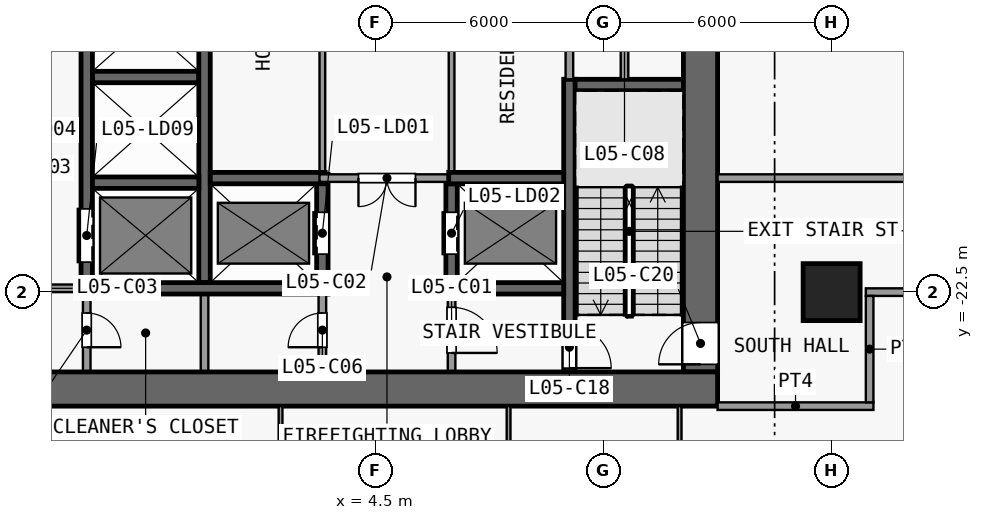
"""IFC4 building model, lengths in metres.
Left out: names, types, materials, properties, quantities, classifications, styles, units other than length and angle.
Written with IfcOpenShell. Run it as: python <this file> out.ifc"""

import sys

from ifc_helpers import new_model, si_unit, direction, frame, frame_2d, origin, origin_2d, place, context, subcontext, project, spatial, rectangle, extrude, element, fill, save


model = new_model("IFC4")
c1 = context("Model", 3, precision=1e-05, world=origin(), true_north=direction((0.0, 1.0)))
c2 = subcontext(c1, "Body", "Model", "MODEL_VIEW")
j1 = project(units=[si_unit("LENGTHUNIT", "METRE"), si_unit("PLANEANGLEUNIT", "RADIAN")], contexts=[c1])
p1 = place(None, origin())
s1 = spatial("IfcSite", under=j1, at=p1, CompositionType="ELEMENT")
p2 = place(p1, origin())
s2 = spatial("IfcBuilding", under=s1, at=p2, CompositionType="ELEMENT")
p3 = place(p2, frame((0.0, 0.0, 28.0)))
s3 = spatial("IfcBuildingStorey", under=s2, at=p3, CompositionType="ELEMENT", Elevation=28.0)
p4 = place(p3, frame((16.5, -22.5, 0.0), z_axis=(0.0, 0.0, 1.0), x_axis=(1.0, 0.0, 0.0)))
e1 = element("IfcColumn", 1, at=p4, inside=s3, PredefinedType="COLUMN", context=c2, shape_type="SweptSolid", body=[
    extrude(rectangle(XDim=1.5, YDim=1.5, at=origin_2d()), origin(), (0.0, 0.0, 1.0), 4.5),
])
p5 = place(p3, frame((-13.5, -25.05, 0.0), z_axis=(0.0, 0.0, 1.0), x_axis=(1.0, 0.0, 0.0)))
e2 = element("IfcWall", 2, at=p5, inside=s3, PredefinedType="SHEAR", context=c2, shape_type="SweptSolid", body=[
    extrude(rectangle(XDim=27.0, YDim=0.9, at=frame_2d((13.5, 0.0))), origin(), (0.0, 0.0, 1.0), 4.1),
])
p6 = place(p3, frame((13.05, -24.6, 0.0), z_axis=(0.0, 0.0, 1.0), x_axis=(0.0, 1.0, 0.0)))
e3 = element("IfcWall", 3, at=p6, inside=s3, PredefinedType="SHEAR", context=c2, shape_type="SweptSolid", body=[
    extrude(rectangle(XDim=16.1, YDim=0.9, at=frame_2d((8.05, 0.0))), origin(), (0.0, 0.0, 1.0), 4.1),
])
p7 = place(p6, frame((0.2, 0.0, 0.0)))
e4 = element("IfcOpeningElement", 4, at=p7, cuts=e3, PredefinedType="OPENING", context=c2, shape_type="SweptSolid", body=[
    extrude(rectangle(XDim=1.1, YDim=2.1, at=frame_2d((0.55, 1.05))), frame((0.0, 0.46, 0.0), z_axis=(0.0, -1.0, 0.0), x_axis=(1.0, 0.0, 0.0)), (0.0, 0.0, 1.0), 0.92),
])
p8 = place(p3, frame((-3.25, -22.4, 0.0), z_axis=(0.0, 0.0, 1.0), x_axis=(-1.0, 0.0, 0.0)))
e5 = element("IfcWall", 5, at=p8, inside=s3, PredefinedType="PARTITIONING", context=c2, shape_type="SweptSolid", body=[
    extrude(rectangle(XDim=3.1, YDim=0.2, at=frame_2d((1.55, 0.0))), origin(), (0.0, 0.0, 1.0), 4.1),
])
p9 = place(p8, frame((0.8, 0.0, 0.0)))
e6 = element("IfcOpeningElement", 6, at=p9, cuts=e5, PredefinedType="OPENING", context=c2, shape_type="SweptSolid", body=[
    extrude(rectangle(XDim=1.5, YDim=2.1, at=frame_2d((0.75, 1.05))), frame((0.0, 0.11, 0.0), z_axis=(0.0, -1.0, 0.0), x_axis=(1.0, 0.0, 0.0)), (0.0, 0.0, 1.0), 0.22),
])
p10 = place(p3, frame((-2.95, -22.4, 0.0), z_axis=(0.0, 0.0, 1.0), x_axis=(1.0, 0.0, 0.0)))
e7 = element("IfcWall", 7, at=p10, inside=s3, PredefinedType="SHEAR", context=c2, shape_type="SweptSolid", body=[
    extrude(rectangle(XDim=6.2, YDim=0.3, at=frame_2d((3.1, 0.0))), origin(), (0.0, 0.0, 1.0), 4.1),
])
p11 = place(p3, frame((6.35, -22.4, 0.0), z_axis=(0.0, 0.0, 1.0), x_axis=(1.0, 0.0, 0.0)))
e8 = element("IfcWall", 8, at=p11, inside=s3, PredefinedType="SHEAR", context=c2, shape_type="SweptSolid", body=[
    extrude(rectangle(XDim=3.1, YDim=0.3, at=frame_2d((1.55, 0.0))), origin(), (0.0, 0.0, 1.0), 4.1),
])
p12 = place(p3, frame((-2.95, -19.62, 0.0), z_axis=(0.0, 0.0, 1.0), x_axis=(1.0, 0.0, 0.0)))
e9 = element("IfcWall", 9, at=p12, inside=s3, PredefinedType="SHEAR", context=c2, shape_type="SweptSolid", body=[
    extrude(rectangle(XDim=2.8, YDim=0.3, at=frame_2d((1.4, 0.0))), origin(), (0.0, 0.0, 1.0), 4.1),
])
p13 = place(p3, frame((0.15, -19.5, 0.0), z_axis=(0.0, 0.0, 1.0), x_axis=(1.0, 0.0, 0.0)))
e10 = element("IfcWall", 10, at=p13, inside=s3, PredefinedType="SHEAR", context=c2, shape_type="SweptSolid", body=[
    extrude(rectangle(XDim=3.025, YDim=0.3, at=frame_2d((1.513, 0.0))), origin(), (0.0, 0.0, 1.0), 4.1),
])
p14 = place(p3, frame((6.575, -19.5, 0.0), z_axis=(0.0, 0.0, 1.0), x_axis=(-1.0, 0.0, 0.0)))
e11 = element("IfcWall", 11, at=p14, inside=s3, PredefinedType="PARTITIONING", context=c2, shape_type="SweptSolid", body=[
    extrude(rectangle(XDim=3.55, YDim=0.2, at=frame_2d((1.775, 0.0))), origin(), (0.0, 0.0, 1.0), 4.1),
])
p15 = place(p14, frame((1.025, 0.0, 0.0)))
e12 = element("IfcOpeningElement", 12, at=p15, cuts=e11, PredefinedType="OPENING", context=c2, shape_type="SweptSolid", body=[
    extrude(rectangle(XDim=1.5, YDim=2.1, at=frame_2d((0.75, 1.05))), frame((0.0, 0.11, 0.0), z_axis=(0.0, -1.0, 0.0), x_axis=(1.0, 0.0, 0.0)), (0.0, 0.0, 1.0), 0.22),
])
p16 = place(p3, frame((6.425, -19.5, 0.0), z_axis=(0.0, 0.0, 1.0), x_axis=(1.0, 0.0, 0.0)))
e13 = element("IfcWall", 13, at=p16, inside=s3, PredefinedType="SHEAR", context=c2, shape_type="SweptSolid", body=[
    extrude(rectangle(XDim=3.025, YDim=0.3, at=frame_2d((1.512, 0.0))), origin(), (0.0, 0.0, 1.0), 4.1),
])
p17 = place(p3, frame((9.5, -17.05, 0.0), z_axis=(0.0, 0.0, 1.0), x_axis=(1.0, 0.0, 0.0)))
e14 = element("IfcWall", 14, at=p17, inside=s3, PredefinedType="SHEAR", context=c2, shape_type="SweptSolid", body=[
    extrude(rectangle(XDim=3.1, YDim=0.3, at=frame_2d((1.55, 0.0))), origin(), (0.0, 0.0, 1.0), 4.1),
])
p18 = place(p3, frame((-2.95, -16.84, 0.0), z_axis=(0.0, 0.0, 1.0), x_axis=(1.0, 0.0, 0.0)))
e15 = element("IfcWall", 15, at=p18, inside=s3, PredefinedType="SHEAR", context=c2, shape_type="SweptSolid", body=[
    extrude(rectangle(XDim=2.8, YDim=0.3, at=frame_2d((1.4, 0.0))), origin(), (0.0, 0.0, 1.0), 4.1),
])
p19 = place(p3, frame((-3.1, -22.55, 0.0), z_axis=(0.0, 0.0, 1.0), x_axis=(0.0, -1.0, 0.0)))
e16 = element("IfcWall", 16, at=p19, inside=s3, PredefinedType="PARTITIONING", context=c2, shape_type="SweptSolid", body=[
    extrude(rectangle(XDim=2.05, YDim=0.2, at=frame_2d((1.025, 0.0))), origin(), (0.0, 0.0, 1.0), 4.1),
])
p20 = place(p19, frame((0.5, 0.0, 0.0)))
e17 = element("IfcOpeningElement", 17, at=p20, cuts=e16, PredefinedType="OPENING", context=c2, shape_type="SweptSolid", body=[
    extrude(rectangle(XDim=0.9, YDim=2.1, at=frame_2d((0.45, 1.05))), frame((0.0, 0.11, 0.0), z_axis=(0.0, -1.0, 0.0), x_axis=(1.0, 0.0, 0.0)), (0.0, 0.0, 1.0), 0.22),
])
p21 = place(p3, frame((-3.1, -22.55, 0.0), z_axis=(0.0, 0.0, 1.0), x_axis=(0.0, 1.0, 0.0)))
e18 = element("IfcWall", 18, at=p21, inside=s3, PredefinedType="SHEAR", context=c2, shape_type="SweptSolid", body=[
    extrude(rectangle(XDim=14.05, YDim=0.3, at=frame_2d((7.025, 0.0))), origin(), (0.0, 0.0, 1.0), 4.1),
])
p22 = place(p21, frame((12.11, 0.0, 0.0)))
e19 = element("IfcOpeningElement", 19, at=p22, cuts=e18, PredefinedType="OPENING", context=c2, shape_type="SweptSolid", body=[
    extrude(rectangle(XDim=1.1, YDim=2.1, at=frame_2d((0.55, 1.05))), frame((0.0, 0.16, 0.0), z_axis=(0.0, -1.0, 0.0), x_axis=(1.0, 0.0, 0.0)), (0.0, 0.0, 1.0), 0.32),
])
p23 = place(p21, frame((0.84, 0.0, 0.0)))
e20 = element("IfcOpeningElement", 20, at=p23, cuts=e18, PredefinedType="OPENING", context=c2, shape_type="SweptSolid", body=[
    extrude(rectangle(XDim=1.4, YDim=2.1, at=frame_2d((0.7, 1.05))), frame((0.0, 0.16, 0.0), z_axis=(0.0, -1.0, 0.0), x_axis=(1.0, 0.0, 0.0)), (0.0, 0.0, 1.0), 0.32),
])
p24 = place(p3, frame((0.0, -24.6, 0.0), z_axis=(0.0, 0.0, 1.0), x_axis=(0.0, 1.0, 0.0)))
e21 = element("IfcWall", 21, at=p24, inside=s3, PredefinedType="PARTITIONING", context=c2, shape_type="SweptSolid", body=[
    extrude(rectangle(XDim=2.05, YDim=0.2, at=frame_2d((1.025, 0.0))), origin(), (0.0, 0.0, 1.0), 4.1),
])
p25 = place(p3, frame((0.0, -22.25, 0.0), z_axis=(0.0, 0.0, 1.0), x_axis=(0.0, 1.0, 0.0)))
e22 = element("IfcWall", 22, at=p25, inside=s3, PredefinedType="SHEAR", context=c2, shape_type="SweptSolid", body=[
    extrude(rectangle(XDim=13.75, YDim=0.3, at=frame_2d((6.875, 0.0))), origin(), (0.0, 0.0, 1.0), 4.1),
])
p26 = place(p3, frame((3.1, -24.6, 0.0), z_axis=(0.0, 0.0, 1.0), x_axis=(0.0, 1.0, 0.0)))
e23 = element("IfcWall", 23, at=p26, inside=s3, PredefinedType="PARTITIONING", context=c2, shape_type="SweptSolid", body=[
    extrude(rectangle(XDim=2.05, YDim=0.2, at=frame_2d((1.025, 0.0))), origin(), (0.0, 0.0, 1.0), 4.1),
])
p27 = place(p26, frame((0.65, 0.0, 0.0)))
e24 = element("IfcOpeningElement", 24, at=p27, cuts=e23, PredefinedType="OPENING", context=c2, shape_type="SweptSolid", body=[
    extrude(rectangle(XDim=0.9, YDim=2.1, at=frame_2d((0.45, 1.05))), frame((0.0, 0.11, 0.0), z_axis=(0.0, -1.0, 0.0), x_axis=(1.0, 0.0, 0.0)), (0.0, 0.0, 1.0), 0.22),
])
p28 = place(p3, frame((3.1, -22.25, 0.0), z_axis=(0.0, 0.0, 1.0), x_axis=(0.0, 1.0, 0.0)))
e25 = element("IfcWall", 25, at=p28, inside=s3, PredefinedType="SHEAR", context=c2, shape_type="SweptSolid", body=[
    extrude(rectangle(XDim=2.85, YDim=0.3, at=frame_2d((1.425, 0.0))), origin(), (0.0, 0.0, 1.0), 4.1),
])
p29 = place(p28, frame((0.75, 0.0, 0.0)))
e26 = element("IfcOpeningElement", 26, at=p29, cuts=e25, PredefinedType="OPENING", context=c2, shape_type="SweptSolid", body=[
    extrude(rectangle(XDim=1.1, YDim=2.1, at=frame_2d((0.55, 1.05))), frame((0.0, 0.16, 0.0), z_axis=(0.0, -1.0, 0.0), x_axis=(1.0, 0.0, 0.0)), (0.0, 0.0, 1.0), 0.32),
])
p30 = place(p3, frame((3.1, -19.4, 0.0), z_axis=(0.0, 0.0, 1.0), x_axis=(0.0, 1.0, 0.0)))
e27 = element("IfcWall", 27, at=p30, inside=s3, PredefinedType="PARTITIONING", context=c2, shape_type="SweptSolid", body=[
    extrude(rectangle(XDim=10.9, YDim=0.15, at=frame_2d((5.45, 0.0))), origin(), (0.0, 0.0, 1.0), 4.1),
])
p31 = place(p30, frame((4.8, 0.0, 0.0)))
e28 = element("IfcOpeningElement", 28, at=p31, cuts=e27, PredefinedType="OPENING", context=c2, shape_type="SweptSolid", body=[
    extrude(rectangle(XDim=1.2, YDim=2.1, at=frame_2d((0.6, 1.05))), frame((0.0, 0.085, 0.0), z_axis=(0.0, -1.0, 0.0), x_axis=(1.0, 0.0, 0.0)), (0.0, 0.0, 1.0), 0.17),
])
p32 = place(p3, frame((6.5, -22.55, 0.0), z_axis=(0.0, 0.0, 1.0), x_axis=(0.0, -1.0, 0.0)))
e29 = element("IfcWall", 29, at=p32, inside=s3, PredefinedType="PARTITIONING", context=c2, shape_type="SweptSolid", body=[
    extrude(rectangle(XDim=2.05, YDim=0.2, at=frame_2d((1.025, 0.0))), origin(), (0.0, 0.0, 1.0), 4.1),
])
p33 = place(p32, frame((0.35, 0.0, 0.0)))
e30 = element("IfcOpeningElement", 30, at=p33, cuts=e29, PredefinedType="OPENING", context=c2, shape_type="SweptSolid", body=[
    extrude(rectangle(XDim=1.2, YDim=2.1, at=frame_2d((0.6, 1.05))), frame((0.0, 0.11, 0.0), z_axis=(0.0, -1.0, 0.0), x_axis=(1.0, 0.0, 0.0)), (0.0, 0.0, 1.0), 0.22),
])
p34 = place(p3, frame((6.5, -22.25, 0.0), z_axis=(0.0, 0.0, 1.0), x_axis=(0.0, 1.0, 0.0)))
e31 = element("IfcWall", 31, at=p34, inside=s3, PredefinedType="SHEAR", context=c2, shape_type="SweptSolid", body=[
    extrude(rectangle(XDim=2.6, YDim=0.3, at=frame_2d((1.3, 0.0))), origin(), (0.0, 0.0, 1.0), 4.1),
])
p35 = place(p34, frame((0.75, 0.0, 0.0)))
e32 = element("IfcOpeningElement", 32, at=p35, cuts=e31, PredefinedType="OPENING", context=c2, shape_type="SweptSolid", body=[
    extrude(rectangle(XDim=1.1, YDim=2.1, at=frame_2d((0.55, 1.05))), frame((0.0, 0.16, 0.0), z_axis=(0.0, -1.0, 0.0), x_axis=(1.0, 0.0, 0.0)), (0.0, 0.0, 1.0), 0.32),
])
p36 = place(p3, frame((6.5, -8.5, 0.0), z_axis=(0.0, 0.0, 1.0), x_axis=(0.0, -1.0, 0.0)))
e33 = element("IfcWall", 33, at=p36, inside=s3, PredefinedType="PARTITIONING", context=c2, shape_type="SweptSolid", body=[
    extrude(rectangle(XDim=10.85, YDim=0.15, at=frame_2d((5.425, 0.0))), origin(), (0.0, 0.0, 1.0), 4.1),
])
p37 = place(p36, frame((6.275, 0.0, 0.0)))
e34 = element("IfcOpeningElement", 34, at=p37, cuts=e33, PredefinedType="OPENING", context=c2, shape_type="SweptSolid", body=[
    extrude(rectangle(XDim=1.2, YDim=2.1, at=frame_2d((0.6, 1.05))), frame((0.0, 0.085, 0.0), z_axis=(0.0, -1.0, 0.0), x_axis=(1.0, 0.0, 0.0)), (0.0, 0.0, 1.0), 0.17),
])
p38 = place(p36, frame((0.925, 0.0, 0.0)))
e35 = element("IfcOpeningElement", 35, at=p38, cuts=e33, PredefinedType="OPENING", context=c2, shape_type="SweptSolid", body=[
    extrude(rectangle(XDim=0.9, YDim=2.1, at=frame_2d((0.45, 1.05))), frame((0.0, 0.085, 0.0), z_axis=(0.0, -1.0, 0.0), x_axis=(1.0, 0.0, 0.0)), (0.0, 0.0, 1.0), 0.17),
])
p39 = place(p3, frame((9.6, -16.9, 0.0), z_axis=(0.0, 0.0, 1.0), x_axis=(0.0, -1.0, 0.0)))
e36 = element("IfcWall", 36, at=p39, inside=s3, PredefinedType="SHEAR", context=c2, shape_type="SweptSolid", body=[
    extrude(rectangle(XDim=7.7, YDim=0.3, at=frame_2d((3.85, 0.0))), origin(), (0.0, 0.0, 1.0), 4.1),
])
p40 = place(p39, frame((6.5, 0.0, 0.0)))
e37 = element("IfcOpeningElement", 37, at=p40, cuts=e36, PredefinedType="OPENING", context=c2, shape_type="SweptSolid", body=[
    extrude(rectangle(XDim=1.1, YDim=2.1, at=frame_2d((0.55, 1.05))), frame((0.0, 0.16, 0.0), z_axis=(0.0, -1.0, 0.0), x_axis=(1.0, 0.0, 0.0)), (0.0, 0.0, 1.0), 0.32),
])
p41 = place(p3, frame((9.6, -16.9, 0.0), z_axis=(0.0, 0.0, 1.0), x_axis=(0.0, 1.0, 0.0)))
e38 = element("IfcWall", 38, at=p41, inside=s3, PredefinedType="PARTITIONING", context=c2, shape_type="SweptSolid", body=[
    extrude(rectangle(XDim=8.4, YDim=0.2, at=frame_2d((4.2, 0.0))), origin(), (0.0, 0.0, 1.0), 4.1),
])
p42 = place(p3, frame((11.05, -11.2, 0.0), z_axis=(0.0, 0.0, 1.0), x_axis=(0.0, -1.0, 0.0)))
e39 = element("IfcWall", 39, at=p42, inside=s3, PredefinedType="PARTITIONING", context=c2, shape_type="SweptSolid", body=[
    extrude(rectangle(XDim=5.7, YDim=0.2, at=frame_2d((2.85, 0.0))), origin(), (0.0, 0.0, 1.0), 4.1),
])
p43 = place(p42, frame((2.525, 0.0, 0.0)))
e40 = element("IfcOpeningElement", 40, at=p43, cuts=e39, PredefinedType="OPENING", context=c2, shape_type="SweptSolid", body=[
    extrude(rectangle(XDim=0.9, YDim=2.1, at=frame_2d((0.45, 1.05))), frame((0.0, 0.11, 0.0), z_axis=(0.0, -1.0, 0.0), x_axis=(1.0, 0.0, 0.0)), (0.0, 0.0, 1.0), 0.22),
])
p44 = place(p3, frame((13.5, -25.5, 0.0), z_axis=(0.0, 0.0, 1.0), x_axis=(1.0, 0.0, 0.0)))
e41 = element("IfcWall", 41, at=p44, inside=s3, PredefinedType="PARTITIONING", context=c2, shape_type="SweptSolid", body=[
    extrude(rectangle(XDim=4.1, YDim=0.2, at=frame_2d((2.05, 0.0))), origin(), (0.0, 0.0, 1.0), 4.1),
])
p45 = place(p3, frame((17.4, -22.5, 0.0), z_axis=(0.0, 0.0, 1.0), x_axis=(1.0, 0.0, 0.0)))
e42 = element("IfcWall", 42, at=p45, inside=s3, PredefinedType="PARTITIONING", context=c2, shape_type="SweptSolid", body=[
    extrude(rectangle(XDim=14.1, YDim=0.2, at=frame_2d((7.05, 0.0))), origin(), (0.0, 0.0, 1.0), 4.1),
])
p46 = place(p3, frame((13.5, -19.5, 0.0), z_axis=(0.0, 0.0, 1.0), x_axis=(1.0, 0.0, 0.0)))
e43 = element("IfcWall", 43, at=p46, inside=s3, PredefinedType="PARTITIONING", context=c2, shape_type="SweptSolid", body=[
    extrude(rectangle(XDim=15.1, YDim=0.2, at=frame_2d((7.55, 0.0))), origin(), (0.0, 0.0, 1.0), 4.1),
])
p47 = place(p46, frame((7.0, 0.0, 0.0)))
e44 = element("IfcOpeningElement", 44, at=p47, cuts=e43, PredefinedType="OPENING", context=c2, shape_type="SweptSolid", body=[
    extrude(rectangle(XDim=1.0, YDim=2.1, at=frame_2d((0.5, 1.05))), frame((0.0, 0.11, 0.0), z_axis=(0.0, -1.0, 0.0), x_axis=(1.0, 0.0, 0.0)), (0.0, 0.0, 1.0), 0.22),
])
for number, where, z_axis, x_axis in (
    (45, (2.0, -31.4, 0.0), (0.0, 0.0, 1.0), (0.0, 1.0, 0.0)),
    (46, (8.0, -31.4, 0.0), (0.0, 0.0, 1.0), (0.0, 1.0, 0.0)),
    (47, (12.5, -31.4, 0.0), (0.0, 0.0, 1.0), (0.0, 1.0, 0.0)),
):
    element("IfcWall", number, at=place(p3, frame(where, z_axis=z_axis, x_axis=x_axis)), inside=s3, PredefinedType="PARTITIONING", context=c2, shape_type="SweptSolid", body=[
        extrude(rectangle(XDim=5.9, YDim=0.1, at=frame_2d((2.95, 0.0))), origin(), (0.0, 0.0, 1.0), 4.1),
    ])
p48 = place(p3, frame((17.5, -25.4, 0.0), z_axis=(0.0, 0.0, 1.0), x_axis=(0.0, 1.0, 0.0)))
e48 = element("IfcWall", 48, at=p48, inside=s3, PredefinedType="PARTITIONING", context=c2, shape_type="SweptSolid", body=[
    extrude(rectangle(XDim=2.8, YDim=0.2, at=frame_2d((1.4, 0.0))), origin(), (0.0, 0.0, 1.0), 4.1),
])
p49 = place(p29, origin())
e49 = element("IfcDoor", 49, at=p49, inside=s3, OperationType="DOUBLE_DOOR_SLIDING", PredefinedType="DOOR", context=c2, shape_type="SweptSolid", body=[
    extrude(rectangle(XDim=1.1, YDim=2.1, at=frame_2d((0.55, 1.05))), frame((0.0, 0.025, 0.0), z_axis=(0.0, -1.0, 0.0), x_axis=(1.0, 0.0, 0.0)), (0.0, 0.0, 1.0), 0.05),
])
fill(e26, e49)
p50 = place(p35, origin())
e50 = element("IfcDoor", 50, at=p50, inside=s3, OperationType="DOUBLE_DOOR_SLIDING", PredefinedType="DOOR", context=c2, shape_type="SweptSolid", body=[
    extrude(rectangle(XDim=1.1, YDim=2.1, at=frame_2d((0.55, 1.05))), frame((0.0, 0.025, 0.0), z_axis=(0.0, -1.0, 0.0), x_axis=(1.0, 0.0, 0.0)), (0.0, 0.0, 1.0), 0.05),
])
fill(e32, e50)
p51 = place(p23, origin())
e51 = element("IfcDoor", 51, at=p51, inside=s3, OperationType="DOUBLE_DOOR_SLIDING", PredefinedType="DOOR", context=c2, shape_type="SweptSolid", body=[
    extrude(rectangle(XDim=1.4, YDim=2.1, at=frame_2d((0.7, 1.05))), frame((0.0, 0.025, 0.0), z_axis=(0.0, -1.0, 0.0), x_axis=(1.0, 0.0, 0.0)), (0.0, 0.0, 1.0), 0.05),
])
fill(e20, e51)
p52 = place(p33, origin())
e52 = element("IfcDoor", 52, at=p52, inside=s3, OperationType="SINGLE_SWING_RIGHT", PredefinedType="DOOR", context=c2, shape_type="SweptSolid", body=[
    extrude(rectangle(XDim=1.2, YDim=2.1, at=frame_2d((0.6, 1.05))), frame((0.0, 0.025, 0.0), z_axis=(0.0, -1.0, 0.0), x_axis=(1.0, 0.0, 0.0)), (0.0, 0.0, 1.0), 0.05),
])
fill(e30, e52)
p53 = place(p15, origin())
e53 = element("IfcDoor", 53, at=p53, inside=s3, OperationType="DOUBLE_DOOR_SINGLE_SWING", PredefinedType="DOOR", context=c2, shape_type="SweptSolid", body=[
    extrude(rectangle(XDim=1.5, YDim=2.1, at=frame_2d((0.75, 1.05))), frame((0.0, 0.025, 0.0), z_axis=(0.0, -1.0, 0.0), x_axis=(1.0, 0.0, 0.0)), (0.0, 0.0, 1.0), 0.05),
])
fill(e12, e53)
p54 = place(p27, origin())
e54 = element("IfcDoor", 54, at=p54, inside=s3, OperationType="SINGLE_SWING_LEFT", PredefinedType="DOOR", context=c2, shape_type="SweptSolid", body=[
    extrude(rectangle(XDim=0.9, YDim=2.1, at=frame_2d((0.45, 1.05))), frame((0.0, 0.025, 0.0), z_axis=(0.0, -1.0, 0.0), x_axis=(1.0, 0.0, 0.0)), (0.0, 0.0, 1.0), 0.05),
])
fill(e24, e54)
p55 = place(p20, origin())
e55 = element("IfcDoor", 55, at=p55, inside=s3, OperationType="SINGLE_SWING_RIGHT", PredefinedType="DOOR", context=c2, shape_type="SweptSolid", body=[
    extrude(rectangle(XDim=0.9, YDim=2.1, at=frame_2d((0.45, 1.05))), frame((0.0, 0.025, 0.0), z_axis=(0.0, -1.0, 0.0), x_axis=(1.0, 0.0, 0.0)), (0.0, 0.0, 1.0), 0.05),
])
fill(e17, e55)
p56 = place(p40, origin())
e56 = element("IfcDoor", 56, at=p56, inside=s3, OperationType="SINGLE_SWING_RIGHT", PredefinedType="DOOR", context=c2, shape_type="SweptSolid", body=[
    extrude(rectangle(XDim=1.1, YDim=2.1, at=frame_2d((0.55, 1.05))), frame((0.0, 0.025, 0.0), z_axis=(0.0, -1.0, 0.0), x_axis=(1.0, 0.0, 0.0)), (0.0, 0.0, 1.0), 0.05),
])
fill(e37, e56)
p57 = place(p7, origin())
e57 = element("IfcDoor", 57, at=p57, inside=s3, OperationType="SINGLE_SWING_LEFT", PredefinedType="DOOR", context=c2, shape_type="SweptSolid", body=[
    extrude(rectangle(XDim=1.1, YDim=2.1, at=frame_2d((0.55, 1.05))), frame((0.0, 0.025, 0.0), z_axis=(0.0, -1.0, 0.0), x_axis=(1.0, 0.0, 0.0)), (0.0, 0.0, 1.0), 0.05),
])
fill(e4, e57)
save(model, sys.argv[1])
